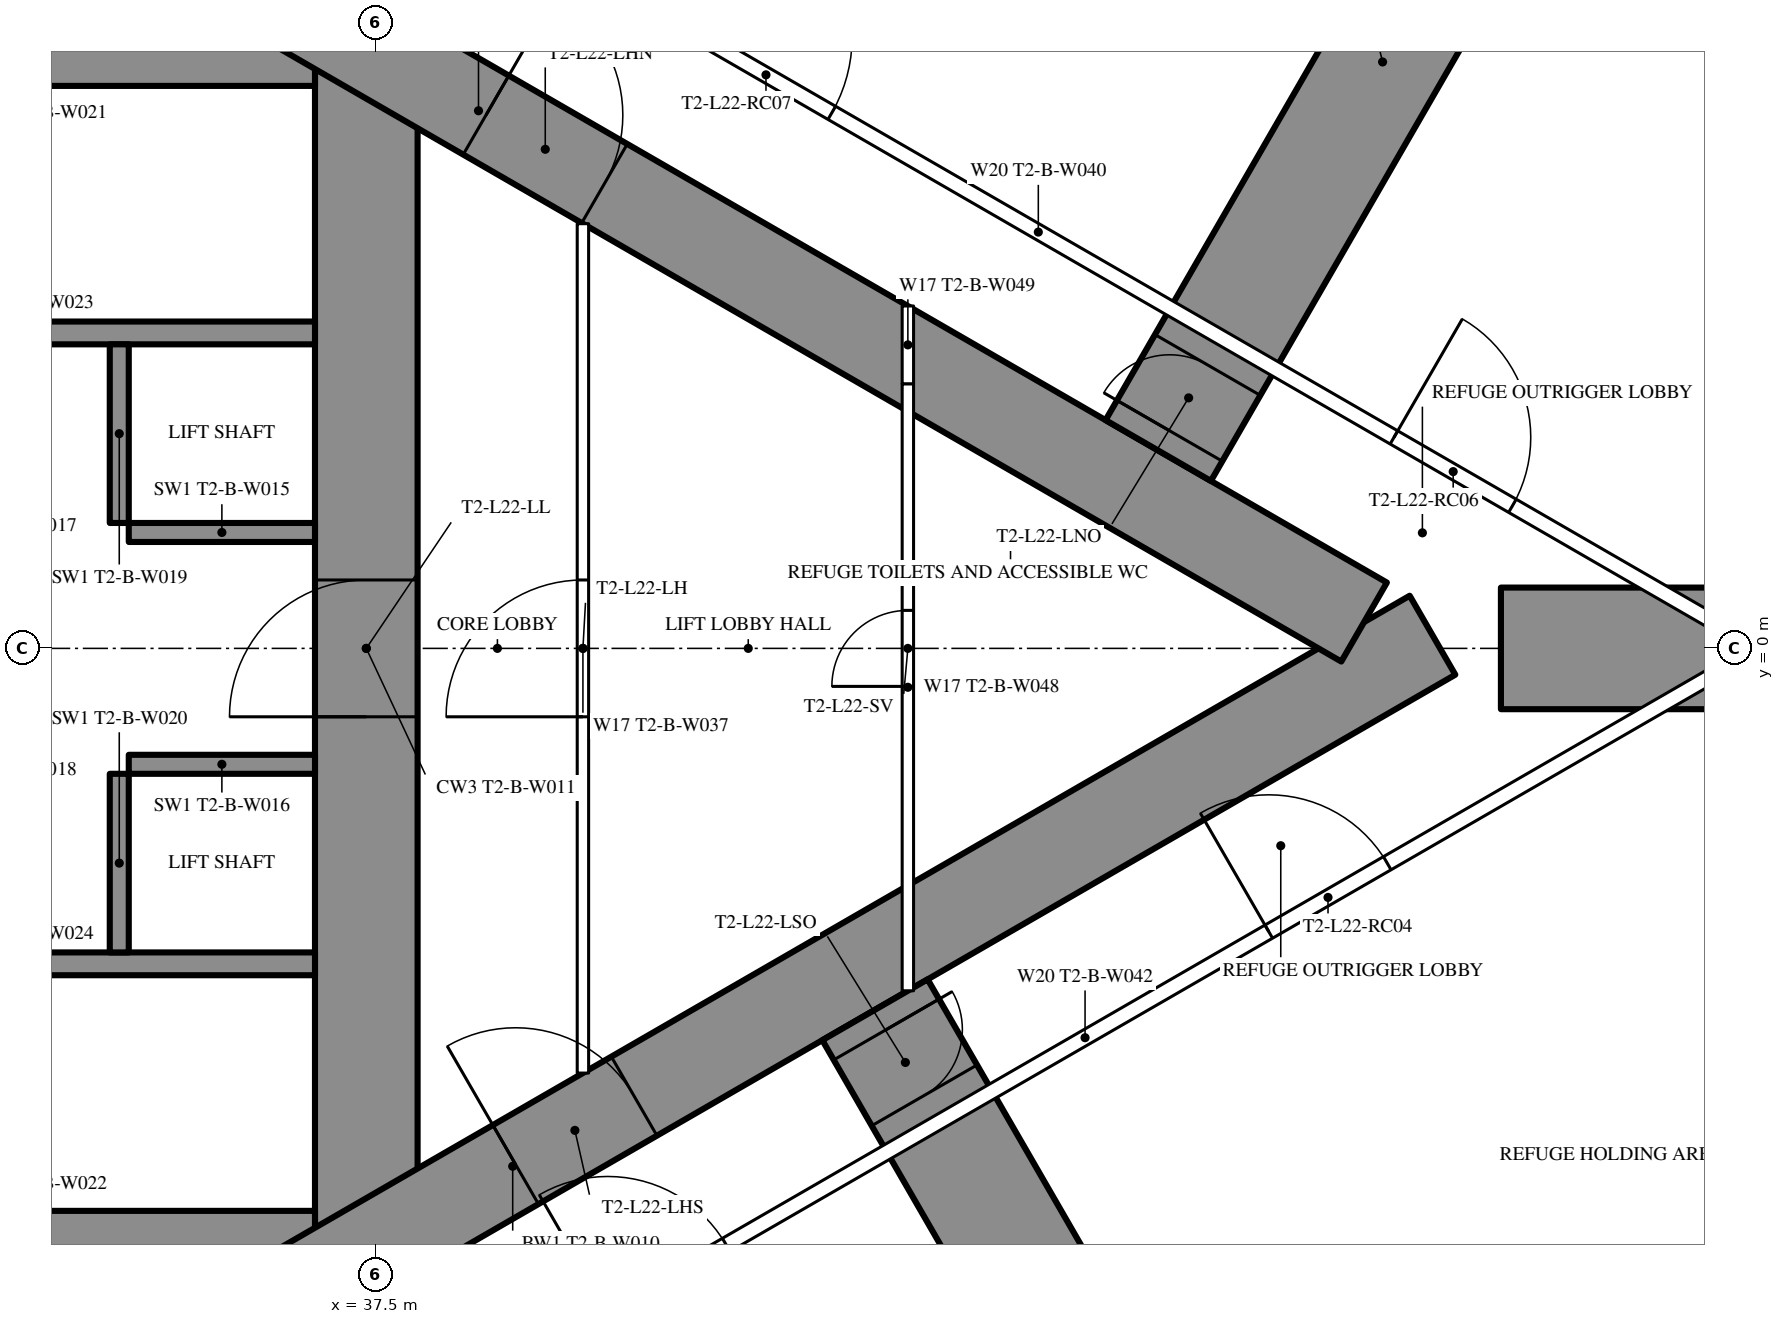
"""IFC4 building model, lengths in metres.
Left out: names, types, materials, properties, quantities, classifications, styles, units other than length and angle.
Written with IfcOpenShell. Run it as: python <this file> out.ifc"""

import sys

from ifc_helpers import new_model, si_unit, direction, frame, frame_2d, origin, place, context, subcontext, project, spatial, rectangle, extrude, element, fill, save


model = new_model("IFC4")
c1 = context("Model", 3, precision=1e-05, world=origin(), true_north=direction((0.0, 1.0)))
c2 = subcontext(c1, "Body", "Model", "MODEL_VIEW")
j1 = project(units=[si_unit("LENGTHUNIT", "METRE"), si_unit("PLANEANGLEUNIT", "RADIAN")], contexts=[c1])
p1 = place(None, origin())
s1 = spatial("IfcSite", under=j1, at=p1, CompositionType="ELEMENT")
p2 = place(p1, origin())
s2 = spatial("IfcBuilding", under=s1, at=p2, CompositionType="ELEMENT")
p3 = place(p2, frame((0.0, 0.0, 87.0)))
s3 = spatial("IfcBuildingStorey", under=s2, at=p3, CompositionType="ELEMENT", Elevation=87.0)
p4 = place(p3, frame((37.375, -8.6, 0.0), z_axis=(0.0, 0.0, 1.0), x_axis=(0.0, 1.0, 0.0)))
e1 = element("IfcWall", 1, at=p4, inside=s3, PredefinedType="SHEAR", context=c2, shape_type="SweptSolid", body=[
    extrude(rectangle(XDim=17.2, YDim=1.35, at=frame_2d((8.6, 0.0))), origin(), (0.0, 0.0, 1.0), 3.6),
])
p5 = place(p4, frame((7.7, 0.0, 0.0)))
e2 = element("IfcOpeningElement", 2, at=p5, cuts=e1, PredefinedType="OPENING", context=c2, shape_type="SweptSolid", body=[
    extrude(rectangle(XDim=1.8, YDim=2.2, at=frame_2d((0.9, 1.1))), frame((0.0, 0.685, 0.0), z_axis=(0.0, -1.0, 0.0), x_axis=(1.0, 0.0, 0.0)), (0.0, 0.0, 1.0), 1.37),
])
p6 = place(p3, frame((28.3, -8.0, 0.0), z_axis=(0.0, 0.0, 1.0), x_axis=(1.0, 0.0, 0.0)))
e3 = element("IfcWall", 3, at=p6, inside=s3, PredefinedType="SHEAR", context=c2, shape_type="SweptSolid", body=[
    extrude(rectangle(XDim=8.4, YDim=1.2, at=frame_2d((4.2, 0.0))), origin(), (0.0, 0.0, 1.0), 3.6),
])
p7 = place(p6, frame((0.25, 0.0, 0.0)))
e4 = element("IfcOpeningElement", 4, at=p7, cuts=e3, PredefinedType="OPENING", context=c2, shape_type="SweptSolid", body=[
    extrude(rectangle(XDim=1.0, YDim=2.2, at=frame_2d((0.5, 1.1))), frame((0.0, 0.61, 0.0), z_axis=(0.0, -1.0, 0.0), x_axis=(1.0, 0.0, 0.0)), (0.0, 0.0, 1.0), 1.22),
])
p8 = place(p3, frame((28.3, 8.0, 0.0), z_axis=(0.0, 0.0, 1.0), x_axis=(1.0, 0.0, 0.0)))
e5 = element("IfcWall", 5, at=p8, inside=s3, PredefinedType="SHEAR", context=c2, shape_type="SweptSolid", body=[
    extrude(rectangle(XDim=8.4, YDim=1.2, at=frame_2d((4.2, 0.0))), origin(), (0.0, 0.0, 1.0), 3.6),
])
p9 = place(p8, frame((0.25, 0.0, 0.0)))
e6 = element("IfcOpeningElement", 6, at=p9, cuts=e5, PredefinedType="OPENING", context=c2, shape_type="SweptSolid", body=[
    extrude(rectangle(XDim=1.0, YDim=2.2, at=frame_2d((0.5, 1.1))), frame((0.0, 0.61, 0.0), z_axis=(0.0, -1.0, 0.0), x_axis=(1.0, 0.0, 0.0)), (0.0, 0.0, 1.0), 1.22),
])
for number, where, z_axis, x_axis in (
    (7, (28.3, -4.15, 0.0), (0.0, 0.0, 1.0), (1.0, 0.0, 0.0)),
    (8, (28.3, 4.15, 0.0), (0.0, 0.0, 1.0), (1.0, 0.0, 0.0)),
):
    element("IfcWall", number, at=place(p3, frame(where, z_axis=z_axis, x_axis=x_axis)), inside=s3, PredefinedType="SHEAR", context=c2, shape_type="SweptSolid", body=[
        extrude(rectangle(XDim=8.4, YDim=0.3, at=frame_2d((4.2, 0.0))), origin(), (0.0, 0.0, 1.0), 3.6),
    ])
p10 = place(p3, frame((34.125, -4.0, 0.0), z_axis=(0.0, 0.0, 1.0), x_axis=(0.0, 1.0, 0.0)))
e9 = element("IfcWall", 9, at=p10, inside=s3, PredefinedType="SHEAR", context=c2, shape_type="SweptSolid", body=[
    extrude(rectangle(XDim=2.35, YDim=0.25, at=frame_2d((1.175, 0.0))), origin(), (0.0, 0.0, 1.0), 3.6),
])
p11 = place(p3, frame((34.25, -1.525, 0.0), z_axis=(0.0, 0.0, 1.0), x_axis=(1.0, 0.0, 0.0)))
e10 = element("IfcWall", 10, at=p11, inside=s3, PredefinedType="SHEAR", context=c2, shape_type="SweptSolid", body=[
    extrude(rectangle(XDim=2.45, YDim=0.25, at=frame_2d((1.225, 0.0))), origin(), (0.0, 0.0, 1.0), 3.6),
])
p12 = place(p3, frame((34.125, 1.65, 0.0), z_axis=(0.0, 0.0, 1.0), x_axis=(0.0, 1.0, 0.0)))
e11 = element("IfcWall", 11, at=p12, inside=s3, PredefinedType="SHEAR", context=c2, shape_type="SweptSolid", body=[
    extrude(rectangle(XDim=2.35, YDim=0.25, at=frame_2d((1.175, 0.0))), origin(), (0.0, 0.0, 1.0), 3.6),
])
p13 = place(p3, frame((34.25, 1.525, 0.0), z_axis=(0.0, 0.0, 1.0), x_axis=(1.0, 0.0, 0.0)))
e12 = element("IfcWall", 12, at=p13, inside=s3, PredefinedType="SHEAR", context=c2, shape_type="SweptSolid", body=[
    extrude(rectangle(XDim=2.45, YDim=0.25, at=frame_2d((1.225, 0.0))), origin(), (0.0, 0.0, 1.0), 3.6),
])
p14 = place(p3, frame((27.2, -13.8, 0.0), z_axis=(0.0, 0.0, 1.0), x_axis=(0.866027159892, 0.499996958321, 0.0)))
e13 = element("IfcWall", 13, at=p14, inside=s3, PredefinedType="SHEAR", context=c2, shape_type="SweptSolid", body=[
    extrude(rectangle(XDim=27.947, YDim=1.2, at=frame_2d((13.973, 0.0))), origin(), (0.0, 0.0, 1.0), 3.6),
])
p15 = place(p14, frame((4.6, 0.0, 0.0)))
e14 = element("IfcOpeningElement", 14, at=p15, cuts=e13, PredefinedType="OPENING", context=c2, shape_type="SweptSolid", body=[
    extrude(rectangle(XDim=1.0, YDim=2.2, at=frame_2d((0.5, 1.1))), frame((0.0, 0.61, 0.0), z_axis=(0.0, -1.0, 0.0), x_axis=(1.0, 0.0, 0.0)), (0.0, 0.0, 1.0), 1.22),
])
p16 = place(p14, frame((14.018, 0.0, 0.0)))
e15 = element("IfcOpeningElement", 15, at=p16, cuts=e13, PredefinedType="OPENING", context=c2, shape_type="SweptSolid", body=[
    extrude(rectangle(XDim=1.8, YDim=2.2, at=frame_2d((0.9, 1.1))), frame((0.0, 0.61, 0.0), z_axis=(0.0, -1.0, 0.0), x_axis=(1.0, 0.0, 0.0)), (0.0, 0.0, 1.0), 1.22),
])
p17 = place(p3, frame((27.2, 13.8, 0.0), z_axis=(0.0, 0.0, 1.0), x_axis=(0.866024515034, -0.500001539357, 0.0)))
e16 = element("IfcWall", 16, at=p17, inside=s3, PredefinedType="SHEAR", context=c2, shape_type="SweptSolid", body=[
    extrude(rectangle(XDim=26.907, YDim=1.2, at=frame_2d((13.454, 0.0))), origin(), (0.0, 0.0, 1.0), 3.6),
])
p18 = place(p17, frame((5.95, 0.0, 0.0)))
e17 = element("IfcOpeningElement", 17, at=p18, cuts=e16, PredefinedType="OPENING", context=c2, shape_type="SweptSolid", body=[
    extrude(rectangle(XDim=1.0, YDim=2.2, at=frame_2d((0.5, 1.1))), frame((0.0, 0.61, 0.0), z_axis=(0.0, -1.0, 0.0), x_axis=(1.0, 0.0, 0.0)), (0.0, 0.0, 1.0), 1.22),
])
p19 = place(p17, frame((13.568, 0.0, 0.0)))
e18 = element("IfcOpeningElement", 18, at=p19, cuts=e16, PredefinedType="OPENING", context=c2, shape_type="SweptSolid", body=[
    extrude(rectangle(XDim=1.8, YDim=2.03, at=frame_2d((0.9, 1.015))), frame((0.0, 0.61, 0.0), z_axis=(0.0, -1.0, 0.0), x_axis=(1.0, 0.0, 0.0)), (0.0, 0.0, 1.0), 1.22),
])
p20 = place(p3, frame((44.067, -4.754, 0.0), z_axis=(0.0, 0.0, 1.0), x_axis=(0.499987574995, -0.866032577246, 0.0)))
e19 = element("IfcWall", 19, at=p20, inside=s3, PredefinedType="SHEAR", context=c2, shape_type="SweptSolid", body=[
    extrude(rectangle(XDim=11.824, YDim=1.6, at=frame_2d((5.912, 0.0))), origin(), (0.0, 0.0, 1.0), 3.6),
])
p21 = place(p20, frame((0.3, 0.0, 0.0)))
e20 = element("IfcOpeningElement", 20, at=p21, cuts=e19, PredefinedType="OPENING", context=c2, shape_type="SweptSolid", body=[
    extrude(rectangle(XDim=1.0, YDim=2.2, at=frame_2d((0.5, 1.1))), frame((0.0, 0.81, 0.0), z_axis=(0.0, -1.0, 0.0), x_axis=(1.0, 0.0, 0.0)), (0.0, 0.0, 1.0), 1.62),
])
p22 = place(p3, frame((52.302, 0.0, 0.0), z_axis=(0.0, 0.0, 1.0), x_axis=(1.0, 0.0, 0.0)))
e21 = element("IfcWall", 21, at=p22, inside=s3, PredefinedType="SHEAR", context=c2, shape_type="SweptSolid", body=[
    extrude(rectangle(XDim=9.198, YDim=1.6, at=frame_2d((4.599, 0.0))), origin(), (0.0, 0.0, 1.0), 3.6),
])
p23 = place(p3, frame((47.794, 2.603, 0.0), z_axis=(0.0, 0.0, 1.0), x_axis=(0.499993342329, 0.866029247559, 0.0)))
e22 = element("IfcWall", 22, at=p23, inside=s3, PredefinedType="SHEAR", context=c2, shape_type="SweptSolid", body=[
    extrude(rectangle(XDim=11.806, YDim=1.6, at=frame_2d((5.903, 0.0))), origin(), (0.0, 0.0, 1.0), 3.6),
])
p24 = place(p23, frame((0.3, 0.0, 0.0)))
e23 = element("IfcOpeningElement", 23, at=p24, cuts=e22, PredefinedType="OPENING", context=c2, shape_type="SweptSolid", body=[
    extrude(rectangle(XDim=1.0, YDim=2.2, at=frame_2d((0.5, 1.1))), frame((0.0, 0.81, 0.0), z_axis=(0.0, -1.0, 0.0), x_axis=(1.0, 0.0, 0.0)), (0.0, 0.0, 1.0), 1.62),
])
p25 = place(p3, frame((49.979, -14.994, 0.0), z_axis=(0.0, 0.0, 1.0), x_axis=(0.849312372751, 0.527890607505, 0.0)))
e24 = element("IfcWall", 24, at=p25, inside=s3, PredefinedType="SHEAR", context=c2, shape_type="SweptSolid", body=[
    extrude(rectangle(XDim=12.906, YDim=1.4, at=frame_2d((6.453, 0.0))), origin(), (0.0, 0.0, 1.0), 3.6),
])
p26 = place(p25, frame((4.953, 0.0, 0.6)))
e25 = element("IfcOpeningElement", 25, at=p26, cuts=e24, PredefinedType="OPENING", context=c2, shape_type="SweptSolid", body=[
    extrude(rectangle(XDim=3.0, YDim=1.2, at=frame_2d((1.5, 0.6))), frame((0.0, 0.71, 0.0), z_axis=(0.0, -1.0, 0.0), x_axis=(1.0, 0.0, 0.0)), (0.0, 0.0, 1.0), 1.42),
])
p27 = place(p3, frame((60.941, 8.181, 0.0), z_axis=(0.0, 0.0, 1.0), x_axis=(-0.841727408736, 0.539902740669, 0.0)))
e26 = element("IfcWall", 26, at=p27, inside=s3, PredefinedType="SHEAR", context=c2, shape_type="SweptSolid", body=[
    extrude(rectangle(XDim=8.606, YDim=1.4, at=frame_2d((4.303, 0.0))), origin(), (0.0, 0.0, 1.0), 3.6),
])
p28 = place(p27, frame((2.803, 0.0, 0.6)))
e27 = element("IfcOpeningElement", 27, at=p28, cuts=e26, PredefinedType="OPENING", context=c2, shape_type="SweptSolid", body=[
    extrude(rectangle(XDim=3.0, YDim=1.2, at=frame_2d((1.5, 0.6))), frame((0.0, 0.71, 0.0), z_axis=(0.0, -1.0, 0.0), x_axis=(1.0, 0.0, 0.0)), (0.0, 0.0, 1.0), 1.42),
])
p29 = place(p3, frame((37.96, -10.243, 0.0), z_axis=(0.0, 0.0, 1.0), x_axis=(0.866026429433, 0.499998223521, 0.0)))
e28 = element("IfcWall", 28, at=p29, inside=s3, PredefinedType="PARTITIONING", context=c2, shape_type="SweptSolid", body=[
    extrude(rectangle(XDim=20.487, YDim=0.2, at=frame_2d((10.243, 0.0))), origin(), (0.0, 0.0, 1.0), 3.35),
])
p30 = place(p29, frame((13.034, 0.0, 0.0)))
e29 = element("IfcOpeningElement", 29, at=p30, cuts=e28, PredefinedType="OPENING", context=c2, shape_type="SweptSolid", body=[
    extrude(rectangle(XDim=1.8, YDim=2.2, at=frame_2d((0.9, 1.1))), frame((0.0, 0.11, 0.0), z_axis=(0.0, -1.0, 0.0), x_axis=(1.0, 0.0, 0.0)), (0.0, 0.0, 1.0), 0.22),
])
p31 = place(p29, frame((2.992, 0.0, 0.0)))
e30 = element("IfcOpeningElement", 30, at=p31, cuts=e28, PredefinedType="OPENING", context=c2, shape_type="SweptSolid", body=[
    extrude(rectangle(XDim=1.8, YDim=2.2, at=frame_2d((0.9, 1.1))), frame((0.0, 0.11, 0.0), z_axis=(0.0, -1.0, 0.0), x_axis=(1.0, 0.0, 0.0)), (0.0, 0.0, 1.0), 0.22),
])
p32 = place(p3, frame((36.834, 10.894, 0.0), z_axis=(0.0, 0.0, 1.0), x_axis=(0.866028157229, -0.499995230863, 0.0)))
e31 = element("IfcWall", 31, at=p32, inside=s3, PredefinedType="PARTITIONING", context=c2, shape_type="SweptSolid", body=[
    extrude(rectangle(XDim=21.667, YDim=0.2, at=frame_2d((10.833, 0.0))), origin(), (0.0, 0.0, 1.0), 3.35),
])
p33 = place(p32, frame((16.236, 0.0, 0.0)))
e32 = element("IfcOpeningElement", 32, at=p33, cuts=e31, PredefinedType="OPENING", context=c2, shape_type="SweptSolid", body=[
    extrude(rectangle(XDim=1.8, YDim=2.2, at=frame_2d((0.9, 1.1))), frame((0.0, 0.11, 0.0), z_axis=(0.0, -1.0, 0.0), x_axis=(1.0, 0.0, 0.0)), (0.0, 0.0, 1.0), 0.22),
])
p34 = place(p32, frame((5.696, 0.0, 0.0)))
e33 = element("IfcOpeningElement", 33, at=p34, cuts=e31, PredefinedType="OPENING", context=c2, shape_type="SweptSolid", body=[
    extrude(rectangle(XDim=2.0, YDim=2.4, at=frame_2d((1.0, 1.2))), frame((0.0, 0.11, 0.0), z_axis=(0.0, -1.0, 0.0), x_axis=(1.0, 0.0, 0.0)), (0.0, 0.0, 1.0), 0.22),
])
p35 = place(p3, frame((40.225, -5.587, 0.0), z_axis=(0.0, 0.0, 1.0), x_axis=(0.0, 1.0, 0.0)))
e34 = element("IfcWall", 34, at=p35, inside=s3, PredefinedType="PARTITIONING", context=c2, shape_type="SweptSolid", body=[
    extrude(rectangle(XDim=11.174, YDim=0.15, at=frame_2d((5.587, 0.0))), origin(), (0.0, 0.0, 1.0), 3.35),
])
p36 = place(p35, frame((4.687, 0.0, 0.0)))
e35 = element("IfcOpeningElement", 35, at=p36, cuts=e34, PredefinedType="OPENING", context=c2, shape_type="SweptSolid", body=[
    extrude(rectangle(XDim=1.8, YDim=2.2, at=frame_2d((0.9, 1.1))), frame((0.0, 0.085, 0.0), z_axis=(0.0, -1.0, 0.0), x_axis=(1.0, 0.0, 0.0)), (0.0, 0.0, 1.0), 0.17),
])
p37 = place(p3, frame((44.5, -4.505, 0.0), z_axis=(0.0, 0.0, 1.0), x_axis=(0.0, 1.0, 0.0)))
e36 = element("IfcWall", 36, at=p37, inside=s3, PredefinedType="PARTITIONING", context=c2, shape_type="SweptSolid", body=[
    extrude(rectangle(XDim=7.986, YDim=0.15, at=frame_2d((3.993, 0.0))), origin(), (0.0, 0.0, 1.0), 3.35),
])
p38 = place(p37, frame((4.005, 0.0, 0.0)))
e37 = element("IfcOpeningElement", 37, at=p38, cuts=e36, PredefinedType="OPENING", context=c2, shape_type="SweptSolid", body=[
    extrude(rectangle(XDim=1.0, YDim=2.2, at=frame_2d((0.5, 1.1))), frame((0.0, 0.085, 0.0), z_axis=(0.0, -1.0, 0.0), x_axis=(1.0, 0.0, 0.0)), (0.0, 0.0, 1.0), 0.17),
])
p39 = place(p3, frame((44.5, 3.481, 0.0), z_axis=(0.0, 0.0, 1.0), x_axis=(0.0, 1.0, 0.0)))
e38 = element("IfcWall", 38, at=p39, inside=s3, PredefinedType="PARTITIONING", context=c2, shape_type="SweptSolid", body=[
    extrude(rectangle(XDim=1.023, YDim=0.15, at=frame_2d((0.512, 0.0))), origin(), (0.0, 0.0, 1.0), 2.05),
])
p40 = place(p21, origin())
e39 = element("IfcDoor", 39, at=p40, inside=s3, OperationType="SINGLE_SWING_LEFT", PredefinedType="DOOR", context=c2, shape_type="SweptSolid", body=[
    extrude(rectangle(XDim=1.0, YDim=2.2, at=frame_2d((0.5, 1.1))), frame((0.0, 0.025, 0.0), z_axis=(0.0, -1.0, 0.0), x_axis=(1.0, 0.0, 0.0)), (0.0, 0.0, 1.0), 0.05),
])
fill(e20, e39)
p41 = place(p24, origin())
e40 = element("IfcDoor", 40, at=p41, inside=s3, OperationType="SINGLE_SWING_LEFT", PredefinedType="DOOR", context=c2, shape_type="SweptSolid", body=[
    extrude(rectangle(XDim=1.0, YDim=2.2, at=frame_2d((0.5, 1.1))), frame((0.0, 0.025, 0.0), z_axis=(0.0, -1.0, 0.0), x_axis=(1.0, 0.0, 0.0)), (0.0, 0.0, 1.0), 0.05),
])
fill(e23, e40)
p42 = place(p30, origin())
e41 = element("IfcDoor", 41, at=p42, inside=s3, OperationType="DOUBLE_DOOR_SINGLE_SWING", PredefinedType="DOOR", context=c2, shape_type="SweptSolid", body=[
    extrude(rectangle(XDim=1.8, YDim=2.2, at=frame_2d((0.9, 1.1))), frame((0.0, 0.025, 0.0), z_axis=(0.0, -1.0, 0.0), x_axis=(1.0, 0.0, 0.0)), (0.0, 0.0, 1.0), 0.05),
])
fill(e29, e41)
p43 = place(p33, origin())
e42 = element("IfcDoor", 42, at=p43, inside=s3, OperationType="DOUBLE_DOOR_SINGLE_SWING", PredefinedType="DOOR", context=c2, shape_type="SweptSolid", body=[
    extrude(rectangle(XDim=1.8, YDim=2.2, at=frame_2d((0.9, 1.1))), frame((0.0, 0.025, 0.0), z_axis=(0.0, -1.0, 0.0), x_axis=(1.0, 0.0, 0.0)), (0.0, 0.0, 1.0), 0.05),
])
fill(e32, e42)
p44 = place(p34, origin())
e43 = element("IfcDoor", 43, at=p44, inside=s3, OperationType="DOUBLE_DOOR_SINGLE_SWING", PredefinedType="DOOR", context=c2, shape_type="SweptSolid", body=[
    extrude(rectangle(XDim=2.0, YDim=2.4, at=frame_2d((1.0, 1.2))), frame((0.0, 0.025, 0.0), z_axis=(0.0, -1.0, 0.0), x_axis=(1.0, 0.0, 0.0)), (0.0, 0.0, 1.0), 0.05),
])
fill(e33, e43)
p45 = place(p31, origin())
e44 = element("IfcDoor", 44, at=p45, inside=s3, OperationType="DOUBLE_DOOR_SINGLE_SWING", PredefinedType="DOOR", context=c2, shape_type="SweptSolid", body=[
    extrude(rectangle(XDim=1.8, YDim=2.2, at=frame_2d((0.9, 1.1))), frame((0.0, 0.025, 0.0), z_axis=(0.0, -1.0, 0.0), x_axis=(1.0, 0.0, 0.0)), (0.0, 0.0, 1.0), 0.05),
])
fill(e30, e44)
p46 = place(p36, origin())
e45 = element("IfcDoor", 45, at=p46, inside=s3, OperationType="DOUBLE_DOOR_SINGLE_SWING", PredefinedType="DOOR", context=c2, shape_type="SweptSolid", body=[
    extrude(rectangle(XDim=1.8, YDim=2.2, at=frame_2d((0.9, 1.1))), frame((0.0, 0.025, 0.0), z_axis=(0.0, -1.0, 0.0), x_axis=(1.0, 0.0, 0.0)), (0.0, 0.0, 1.0), 0.05),
])
fill(e35, e45)
p47 = place(p38, origin())
e46 = element("IfcDoor", 46, at=p47, inside=s3, OperationType="SINGLE_SWING_LEFT", PredefinedType="DOOR", context=c2, shape_type="SweptSolid", body=[
    extrude(rectangle(XDim=1.0, YDim=2.2, at=frame_2d((0.5, 1.1))), frame((0.0, 0.025, 0.0), z_axis=(0.0, -1.0, 0.0), x_axis=(1.0, 0.0, 0.0)), (0.0, 0.0, 1.0), 0.05),
])
fill(e37, e46)
p48 = place(p16, origin())
e47 = element("IfcDoor", 47, at=p48, inside=s3, OperationType="DOUBLE_DOOR_SINGLE_SWING", PredefinedType="DOOR", context=c2, shape_type="SweptSolid", body=[
    extrude(rectangle(XDim=1.8, YDim=2.2, at=frame_2d((0.9, 1.1))), frame((0.0, 0.025, 0.0), z_axis=(0.0, -1.0, 0.0), x_axis=(1.0, 0.0, 0.0)), (0.0, 0.0, 1.0), 0.05),
])
fill(e15, e47)
p49 = place(p19, origin())
e48 = element("IfcDoor", 48, at=p49, inside=s3, OperationType="DOUBLE_DOOR_SINGLE_SWING", PredefinedType="DOOR", context=c2, shape_type="SweptSolid", body=[
    extrude(rectangle(XDim=1.8, YDim=2.03, at=frame_2d((0.9, 1.015))), frame((0.0, 0.025, 0.0), z_axis=(0.0, -1.0, 0.0), x_axis=(1.0, 0.0, 0.0)), (0.0, 0.0, 1.0), 0.05),
])
fill(e18, e48)
p50 = place(p5, origin())
e49 = element("IfcDoor", 49, at=p50, inside=s3, OperationType="DOUBLE_DOOR_SINGLE_SWING", PredefinedType="DOOR", context=c2, shape_type="SweptSolid", body=[
    extrude(rectangle(XDim=1.8, YDim=2.2, at=frame_2d((0.9, 1.1))), frame((0.0, 0.025, 0.0), z_axis=(0.0, -1.0, 0.0), x_axis=(1.0, 0.0, 0.0)), (0.0, 0.0, 1.0), 0.05),
])
fill(e2, e49)
save(model, sys.argv[1])
